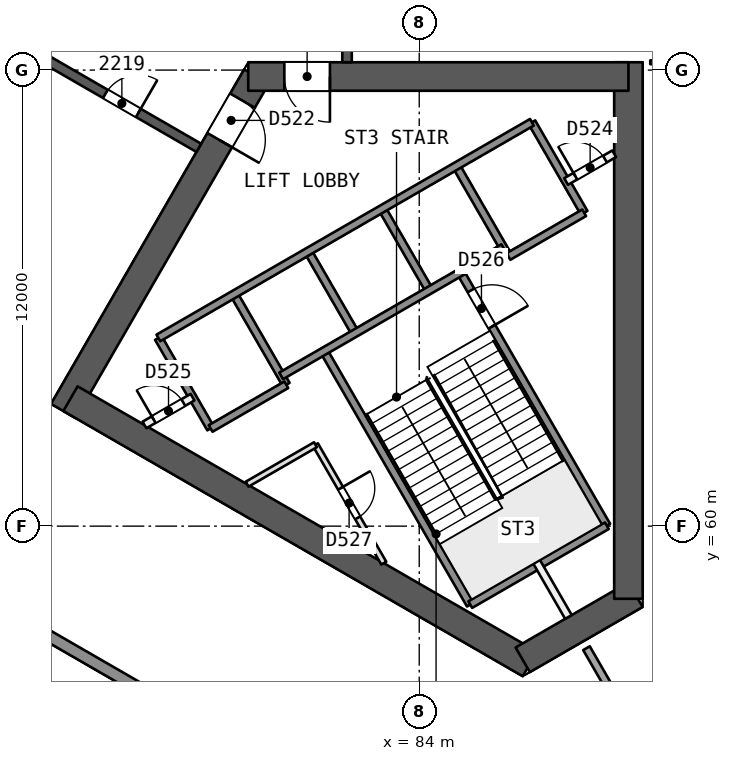
"""IFC4 building model, lengths in metres.
Left out: names, types, materials, properties, quantities, classifications, styles, units other than length and angle.
Written with IfcOpenShell. Run it as: python <this file> out.ifc"""

import sys

from ifc_helpers import new_model, si_unit, direction, frame, frame_2d, origin, place, context, subcontext, project, spatial, rectangle, extrude, element, fill, save


model = new_model("IFC4")
c1 = context("Model", 3, precision=1e-05, world=origin(), true_north=direction((0.0, 1.0)))
c2 = subcontext(c1, "Body", "Model", "MODEL_VIEW")
j1 = project(units=[si_unit("LENGTHUNIT", "METRE"), si_unit("PLANEANGLEUNIT", "RADIAN")], contexts=[c1])
p1 = place(None, origin())
s1 = spatial("IfcSite", under=j1, at=p1, CompositionType="ELEMENT")
p2 = place(p1, origin())
s2 = spatial("IfcBuilding", under=s1, at=p2, CompositionType="ELEMENT")
p3 = place(p2, frame((0.0, 0.0, 94.3)))
s3 = spatial("IfcBuildingStorey", under=s2, at=p3, CompositionType="ELEMENT", Elevation=94.3)
p4 = place(p3, frame((79.717, 71.831, 0.0), z_axis=(0.0, 0.0, 1.0), x_axis=(-0.499996230114, -0.866027580318, 0.0)))
e1 = element("IfcWall", 1, at=p4, inside=s3, PredefinedType="SHEAR", context=c2, shape_type="SweptSolid", body=[
    extrude(rectangle(XDim=10.164, YDim=0.75, at=frame_2d((5.082, 0.0))), origin(), (0.0, 0.0, 1.0), 3.7),
])
p5 = place(p4, frame((0.733, 0.0, 0.0)))
e2 = element("IfcOpeningElement", 2, at=p5, cuts=e1, PredefinedType="OPENING", context=c2, shape_type="SweptSolid", body=[
    extrude(rectangle(XDim=1.2, YDim=2.1, at=frame_2d((0.6, 1.05))), frame((0.0, 0.385, 0.0), z_axis=(0.0, -1.0, 0.0), x_axis=(1.0, 0.0, 0.0)), (0.0, 0.0, 1.0), 0.771),
])
p6 = place(p3, frame((74.822, 63.354, 0.0), z_axis=(0.0, 0.0, 1.0), x_axis=(0.8660248072, -0.500001033313, 0.0)))
e3 = element("IfcWall", 3, at=p6, inside=s3, PredefinedType="SHEAR", context=c2, shape_type="SweptSolid", body=[
    extrude(rectangle(XDim=13.958, YDim=0.75, at=frame_2d((6.979, 0.0))), origin(), (0.0, 0.0, 1.0), 3.7),
])
p7 = place(p3, frame((86.723, 56.483, 0.0), z_axis=(0.0, 0.0, 1.0), x_axis=(0.866017201164, 0.500014207086, 0.0)))
e4 = element("IfcWall", 4, at=p7, inside=s3, PredefinedType="SHEAR", context=c2, shape_type="SweptSolid", body=[
    extrude(rectangle(XDim=3.429, YDim=0.75, at=frame_2d((1.714, 0.0))), origin(), (0.0, 0.0, 1.0), 3.7),
])
p8 = place(p3, frame((89.505, 58.089, 0.0), z_axis=(0.0, 0.0, 1.0), x_axis=(0.0, 1.0, 0.0)))
e5 = element("IfcWall", 5, at=p8, inside=s3, PredefinedType="SHEAR", context=c2, shape_type="SweptSolid", body=[
    extrude(rectangle(XDim=14.117, YDim=0.75, at=frame_2d((7.059, 0.0))), origin(), (0.0, 0.0, 1.0), 3.7),
])
p9 = place(p3, frame((89.505, 71.831, 0.0), z_axis=(0.0, 0.0, 1.0), x_axis=(-1.0, 0.0, 0.0)))
e6 = element("IfcWall", 6, at=p9, inside=s3, PredefinedType="SHEAR", context=c2, shape_type="SweptSolid", body=[
    extrude(rectangle(XDim=10.005, YDim=0.75, at=frame_2d((5.002, 0.0))), origin(), (0.0, 0.0, 1.0), 3.7),
])
p10 = place(p9, frame((7.855, 0.0, 0.0)))
e7 = element("IfcOpeningElement", 7, at=p10, cuts=e6, PredefinedType="OPENING", context=c2, shape_type="SweptSolid", body=[
    extrude(rectangle(XDim=1.2, YDim=2.1, at=frame_2d((0.6, 1.05))), frame((0.0, 0.385, 0.0), z_axis=(0.0, -1.0, 0.0), x_axis=(1.0, 0.0, 0.0)), (0.0, 0.0, 1.0), 0.771),
])
p11 = place(p3, frame((82.1, 72.206, 0.0), z_axis=(0.0, 0.0, 1.0), x_axis=(0.0, 1.0, 0.0)))
e8 = element("IfcWall", 8, at=p11, inside=s3, PredefinedType="SHEAR", context=c2, shape_type="SweptSolid", body=[
    extrude(rectangle(XDim=15.588, YDim=0.25, at=frame_2d((7.794, 0.0))), origin(), (0.0, 0.0, 1.0), 3.25),
])
p12 = place(p11, frame((1.527, 0.0, 0.0)))
e9 = element("IfcOpeningElement", 9, at=p12, cuts=e8, PredefinedType="OPENING", context=c2, shape_type="SweptSolid", body=[
    extrude(rectangle(XDim=1.0, YDim=2.1, at=frame_2d((0.5, 1.05))), frame((0.0, 0.135, 0.0), z_axis=(0.0, -1.0, 0.0), x_axis=(1.0, 0.0, 0.0)), (0.0, 0.0, 1.0), 0.271),
])
p13 = place(p11, frame((8.694, 0.0, 0.0)))
e10 = element("IfcOpeningElement", 10, at=p13, cuts=e8, PredefinedType="OPENING", context=c2, shape_type="SweptSolid", body=[
    extrude(rectangle(XDim=1.1, YDim=2.1, at=frame_2d((0.55, 1.05))), frame((0.0, 0.135, 0.0), z_axis=(0.0, -1.0, 0.0), x_axis=(1.0, 0.0, 0.0)), (0.0, 0.0, 1.0), 0.271),
])
p14 = place(p11, frame((13.062, 0.0, 0.0)))
e11 = element("IfcOpeningElement", 11, at=p14, cuts=e8, PredefinedType="OPENING", context=c2, shape_type="SweptSolid", body=[
    extrude(rectangle(XDim=1.0, YDim=2.1, at=frame_2d((0.5, 1.05))), frame((0.0, 0.135, 0.0), z_axis=(0.0, -1.0, 0.0), x_axis=(1.0, 0.0, 0.0)), (0.0, 0.0, 1.0), 0.271),
])
p15 = place(p3, frame((64.7, 77.748, 0.0), z_axis=(0.0, 0.0, 1.0), x_axis=(0.866026492143, -0.499998114903, 0.0)))
e12 = element("IfcWall", 12, at=p15, inside=s3, PredefinedType="SHEAR", context=c2, shape_type="SweptSolid", body=[
    extrude(rectangle(XDim=15.588, YDim=0.25, at=frame_2d((7.794, 0.0))), origin(), (0.0, 0.0, 1.0), 3.25),
])
p16 = place(p15, frame((1.738, 0.0, 0.0)))
e13 = element("IfcOpeningElement", 13, at=p16, cuts=e12, PredefinedType="OPENING", context=c2, shape_type="SweptSolid", body=[
    extrude(rectangle(XDim=1.2, YDim=2.4, at=frame_2d((0.6, 1.2))), frame((0.0, 0.135, 0.0), z_axis=(0.0, -1.0, 0.0), x_axis=(1.0, 0.0, 0.0)), (0.0, 0.0, 1.0), 0.271),
])
p17 = place(p15, frame((5.785, 0.0, 0.0)))
e14 = element("IfcOpeningElement", 14, at=p17, cuts=e12, PredefinedType="OPENING", context=c2, shape_type="SweptSolid", body=[
    extrude(rectangle(XDim=0.9, YDim=2.1, at=frame_2d((0.45, 1.05))), frame((0.0, 0.135, 0.0), z_axis=(0.0, -1.0, 0.0), x_axis=(1.0, 0.0, 0.0)), (0.0, 0.0, 1.0), 0.271),
])
p18 = place(p15, frame((8.903, 0.0, 0.0)))
e15 = element("IfcOpeningElement", 15, at=p18, cuts=e12, PredefinedType="OPENING", context=c2, shape_type="SweptSolid", body=[
    extrude(rectangle(XDim=0.9, YDim=2.1, at=frame_2d((0.45, 1.05))), frame((0.0, 0.135, 0.0), z_axis=(0.0, -1.0, 0.0), x_axis=(1.0, 0.0, 0.0)), (0.0, 0.0, 1.0), 0.271),
])
p19 = place(p15, frame((12.75, 0.0, 0.0)))
e16 = element("IfcOpeningElement", 16, at=p19, cuts=e12, PredefinedType="OPENING", context=c2, shape_type="SweptSolid", body=[
    extrude(rectangle(XDim=1.0, YDim=2.1, at=frame_2d((0.5, 1.05))), frame((0.0, 0.135, 0.0), z_axis=(0.0, -1.0, 0.0), x_axis=(1.0, 0.0, 0.0)), (0.0, 0.0, 1.0), 0.271),
])
p20 = place(p3, frame((90.079, 72.206, 0.0), z_axis=(0.0, 0.0, 1.0), x_axis=(1.0, 0.0, 0.0)))
e17 = element("IfcWall", 17, at=p20, inside=s3, PredefinedType="PARTITIONING", context=c2, shape_type="SweptSolid", body=[
    extrude(rectangle(XDim=4.974, YDim=0.1, at=frame_2d((2.487, 0.0))), origin(), (0.0, 0.0, 1.0), 3.25),
])
p21 = place(p20, frame((2.037, 0.0, 0.0)))
e18 = element("IfcOpeningElement", 18, at=p21, cuts=e17, PredefinedType="OPENING", context=c2, shape_type="SweptSolid", body=[
    extrude(rectangle(XDim=0.9, YDim=2.1, at=frame_2d((0.45, 1.05))), frame((0.0, 0.061, 0.0), z_axis=(0.0, -1.0, 0.0), x_axis=(1.0, 0.0, 0.0)), (0.0, 0.0, 1.0), 0.121),
])
p22 = place(p3, frame((88.401, 56.789, 0.0), z_axis=(0.0, 0.0, 1.0), x_axis=(0.499996437432, -0.866027460624, 0.0)))
e19 = element("IfcWall", 19, at=p22, inside=s3, PredefinedType="PARTITIONING", context=c2, shape_type="SweptSolid", body=[
    extrude(rectangle(XDim=8.305, YDim=0.2, at=frame_2d((4.152, 0.0))), origin(), (0.0, 0.0, 1.0), 3.25),
])
p23 = place(p3, frame((90.054, 47.981, 0.0), z_axis=(0.0, 0.0, 1.0), x_axis=(-0.866025390357, 0.500000023256, 0.0)))
e20 = element("IfcWall", 20, at=p23, inside=s3, PredefinedType="SOLIDWALL", context=c2, shape_type="SweptSolid", body=[
    extrude(rectangle(XDim=58.093, YDim=0.3, at=frame_2d((29.046, 0.0))), origin(), (0.0, 0.0, 1.0), 3.25),
])
p24 = place(p23, frame((43.972, 0.0, 0.0)))
e21 = element("IfcOpeningElement", 21, at=p24, cuts=e20, PredefinedType="OPENING", context=c2, shape_type="SweptSolid", body=[
    extrude(rectangle(XDim=2.4, YDim=2.4, at=frame_2d((1.2, 1.2))), frame((0.0, 0.161, 0.0), z_axis=(0.0, -1.0, 0.0), x_axis=(1.0, 0.0, 0.0)), (0.0, 0.0, 1.0), 0.321),
])
p25 = place(p23, frame((22.39, 0.0, 0.0)))
e22 = element("IfcOpeningElement", 22, at=p25, cuts=e20, PredefinedType="OPENING", context=c2, shape_type="SweptSolid", body=[
    extrude(rectangle(XDim=2.4, YDim=2.4, at=frame_2d((1.2, 1.2))), frame((0.0, 0.161, 0.0), z_axis=(0.0, -1.0, 0.0), x_axis=(1.0, 0.0, 0.0)), (0.0, 0.0, 1.0), 0.321),
])
p26 = place(p23, frame((10.643, 0.0, 0.0)))
e23 = element("IfcOpeningElement", 23, at=p26, cuts=e20, PredefinedType="OPENING", context=c2, shape_type="SweptSolid", body=[
    extrude(rectangle(XDim=2.4, YDim=2.4, at=frame_2d((1.2, 1.2))), frame((0.0, 0.161, 0.0), z_axis=(0.0, -1.0, 0.0), x_axis=(1.0, 0.0, 0.0)), (0.0, 0.0, 1.0), 0.321),
])
p27 = place(p23, frame((29.705, 0.0, 0.9)))
e24 = element("IfcOpeningElement", 24, at=p27, cuts=e20, PredefinedType="OPENING", context=c2, shape_type="SweptSolid", body=[
    extrude(rectangle(XDim=1.8, YDim=1.5, at=frame_2d((0.9, 0.75))), frame((0.0, 0.161, 0.0), z_axis=(0.0, -1.0, 0.0), x_axis=(1.0, 0.0, 0.0)), (0.0, 0.0, 1.0), 0.321),
])
p28 = place(p23, frame((26.587, 0.0, 0.9)))
e25 = element("IfcOpeningElement", 25, at=p28, cuts=e20, PredefinedType="OPENING", context=c2, shape_type="SweptSolid", body=[
    extrude(rectangle(XDim=1.8, YDim=1.5, at=frame_2d((0.9, 0.75))), frame((0.0, 0.161, 0.0), z_axis=(0.0, -1.0, 0.0), x_axis=(1.0, 0.0, 0.0)), (0.0, 0.0, 1.0), 0.321),
])
p29 = place(p3, frame((77.135, 64.952, 0.0), z_axis=(0.0, 0.0, 1.0), x_axis=(0.499996545922, -0.866027397988, 0.0)))
e26 = element("IfcWall", 26, at=p29, inside=s3, PredefinedType="SOLIDWALL", context=c2, shape_type="SweptSolid", body=[
    extrude(rectangle(XDim=2.75, YDim=0.2, at=frame_2d((1.375, 0.0))), origin(), (0.0, 0.0, 1.0), 3.25),
])
p30 = place(p3, frame((81.269, 62.142, 0.0), z_axis=(0.0, 0.0, 1.0), x_axis=(0.500043557135, -0.866000254601, 0.0)))
e27 = element("IfcWall", 27, at=p30, inside=s3, PredefinedType="PARTITIONING", context=c2, shape_type="SweptSolid", body=[
    extrude(rectangle(XDim=3.598, YDim=0.15, at=frame_2d((1.799, 0.0))), origin(), (0.0, 0.0, 1.0), 3.25),
])
p31 = place(p30, frame((1.322, 0.0, 0.0)))
e28 = element("IfcOpeningElement", 28, at=p31, cuts=e27, PredefinedType="OPENING", context=c2, shape_type="SweptSolid", body=[
    extrude(rectangle(XDim=0.9, YDim=2.1, at=frame_2d((0.45, 1.05))), frame((0.0, 0.085, 0.0), z_axis=(0.0, -1.0, 0.0), x_axis=(1.0, 0.0, 0.0)), (0.0, 0.0, 1.0), 0.171),
])
p32 = place(p3, frame((79.127, 66.102, 0.0), z_axis=(0.0, 0.0, 1.0), x_axis=(0.499996545922, -0.866027397988, 0.0)))
e29 = element("IfcWall", 29, at=p32, inside=s3, PredefinedType="SOLIDWALL", context=c2, shape_type="SweptSolid", body=[
    extrude(rectangle(XDim=2.75, YDim=0.2, at=frame_2d((1.375, 0.0))), origin(), (0.0, 0.0, 1.0), 3.25),
])
p33 = place(p3, frame((81.493, 64.604, 0.0), z_axis=(0.0, 0.0, 1.0), x_axis=(0.500006057782, -0.866021906294, 0.0)))
e30 = element("IfcWall", 30, at=p33, inside=s3, PredefinedType="SOLIDWALL", context=c2, shape_type="SweptSolid", body=[
    extrude(rectangle(XDim=7.7, YDim=0.2, at=frame_2d((3.85, 0.0))), origin(), (0.0, 0.0, 1.0), 3.25),
])
p34 = place(p3, frame((81.076, 67.227, 0.0), z_axis=(0.0, 0.0, 1.0), x_axis=(0.50000366821, -0.866023285932, 0.0)))
e31 = element("IfcWall", 31, at=p34, inside=s3, PredefinedType="SOLIDWALL", context=c2, shape_type="SweptSolid", body=[
    extrude(rectangle(XDim=2.48, YDim=0.2, at=frame_2d((1.24, 0.0))), origin(), (0.0, 0.0, 1.0), 3.25),
])
p35 = place(p3, frame((87.09, 59.06, 0.0), z_axis=(0.0, 0.0, 1.0), x_axis=(0.499937194881, -0.866061661301, 0.0)))
e32 = element("IfcWall", 32, at=p35, inside=s3, PredefinedType="PARTITIONING", context=c2, shape_type="SweptSolid", body=[
    extrude(rectangle(XDim=1.673, YDim=0.2, at=frame_2d((0.836, 0.0))), origin(), (0.0, 0.0, 1.0), 3.25),
])
p36 = place(p3, frame((83.024, 68.352, 0.0), z_axis=(0.0, 0.0, 1.0), x_axis=(0.50000366821, -0.866023285932, 0.0)))
e33 = element("IfcWall", 33, at=p36, inside=s3, PredefinedType="SOLIDWALL", context=c2, shape_type="SweptSolid", body=[
    extrude(rectangle(XDim=2.48, YDim=0.2, at=frame_2d((1.24, 0.0))), origin(), (0.0, 0.0, 1.0), 3.25),
])
p37 = place(p3, frame((85.087, 66.679, 0.0), z_axis=(0.0, 0.0, 1.0), x_axis=(0.500019787375, -0.866013979237, 0.0)))
e34 = element("IfcWall", 34, at=p37, inside=s3, PredefinedType="SOLIDWALL", context=c2, shape_type="SweptSolid", body=[
    extrude(rectangle(XDim=7.7, YDim=0.2, at=frame_2d((3.85, 0.0))), origin(), (0.0, 0.0, 1.0), 3.25),
])
p38 = place(p37, frame((0.55, 0.0, 0.0)))
e35 = element("IfcOpeningElement", 35, at=p38, cuts=e34, PredefinedType="OPENING", context=c2, shape_type="SweptSolid", body=[
    extrude(rectangle(XDim=1.1, YDim=2.1, at=frame_2d((0.55, 1.05))), frame((0.0, 0.11, 0.0), z_axis=(0.0, -1.0, 0.0), x_axis=(1.0, 0.0, 0.0)), (0.0, 0.0, 1.0), 0.221),
])
for number, where, z_axis, x_axis in (
    (36, (84.973, 69.477, 0.0), (0.0, 0.0, 1.0), (0.5, -0.866, 0.0)),
    (37, (86.965, 70.626, 0.0), (0.0, 0.0, 1.0), (0.5, -0.866, 0.0)),
):
    element("IfcWall", number, at=place(p3, frame(where, z_axis=z_axis, x_axis=x_axis)), inside=s3, PredefinedType="SOLIDWALL", context=c2, shape_type="SweptSolid", body=[
        extrude(rectangle(XDim=2.75, YDim=0.2, at=frame_2d((1.375, 0.0))), origin(), (0.0, 0.0, 1.0), 3.25),
    ])
p39 = place(p3, frame((77.135, 64.952, 0.0), z_axis=(0.0, 0.0, 1.0), x_axis=(0.866031916153, 0.499988720078, 0.0)))
e38 = element("IfcWall", 38, at=p39, inside=s3, PredefinedType="SOLIDWALL", context=c2, shape_type="SweptSolid", body=[
    extrude(rectangle(XDim=11.35, YDim=0.2, at=frame_2d((5.675, 0.0))), origin(), (0.0, 0.0, 1.0), 3.25),
])
p40 = place(p3, frame((76.77, 62.662, 0.0), z_axis=(0.0, 0.0, 1.0), x_axis=(0.866054810376, 0.49994906283, 0.0)))
e39 = element("IfcWall", 39, at=p40, inside=s3, PredefinedType="PARTITIONING", context=c2, shape_type="SweptSolid", body=[
    extrude(rectangle(XDim=1.461, YDim=0.2, at=frame_2d((0.73, 0.0))), origin(), (0.0, 0.0, 1.0), 3.25),
])
p41 = place(p40, frame((0.281, 0.0, 0.0)))
e40 = element("IfcOpeningElement", 40, at=p41, cuts=e39, PredefinedType="OPENING", context=c2, shape_type="SweptSolid", body=[
    extrude(rectangle(XDim=0.9, YDim=2.1, at=frame_2d((0.45, 1.05))), frame((0.0, 0.11, 0.0), z_axis=(0.0, -1.0, 0.0), x_axis=(1.0, 0.0, 0.0)), (0.0, 0.0, 1.0), 0.221),
])
p42 = place(p3, frame((87.865, 69.068, 0.0), z_axis=(0.0, 0.0, 1.0), x_axis=(0.865982457891, 0.500074377092, 0.0)))
e41 = element("IfcWall", 41, at=p42, inside=s3, PredefinedType="PARTITIONING", context=c2, shape_type="SweptSolid", body=[
    extrude(rectangle(XDim=1.461, YDim=0.2, at=frame_2d((0.73, 0.0))), origin(), (0.0, 0.0, 1.0), 3.25),
])
p43 = place(p42, frame((0.281, 0.0, 0.0)))
e42 = element("IfcOpeningElement", 42, at=p43, cuts=e41, PredefinedType="OPENING", context=c2, shape_type="SweptSolid", body=[
    extrude(rectangle(XDim=0.9, YDim=2.1, at=frame_2d((0.45, 1.05))), frame((0.0, 0.11, 0.0), z_axis=(0.0, -1.0, 0.0), x_axis=(1.0, 0.0, 0.0)), (0.0, 0.0, 1.0), 0.221),
])
p44 = place(p3, frame((80.367, 63.954, 0.0), z_axis=(0.0, 0.0, 1.0), x_axis=(0.866026575979, 0.499997969693, 0.0)))
e43 = element("IfcWall", 43, at=p44, inside=s3, PredefinedType="SOLIDWALL", context=c2, shape_type="SweptSolid", body=[
    extrude(rectangle(XDim=6.75, YDim=0.2, at=frame_2d((3.375, 0.0))), origin(), (0.0, 0.0, 1.0), 3.25),
])
p45 = place(p3, frame((78.51, 62.57, 0.0), z_axis=(0.0, 0.0, 1.0), x_axis=(0.866053019151, 0.499952165731, 0.0)))
e44 = element("IfcWall", 44, at=p45, inside=s3, PredefinedType="SOLIDWALL", context=c2, shape_type="SweptSolid", body=[
    extrude(rectangle(XDim=2.3, YDim=0.2, at=frame_2d((1.15, 0.0))), origin(), (0.0, 0.0, 1.0), 3.25),
])
p46 = place(p3, frame((86.348, 67.095, 0.0), z_axis=(0.0, 0.0, 1.0), x_axis=(0.86602648383, 0.499998129301, 0.0)))
e45 = element("IfcWall", 45, at=p46, inside=s3, PredefinedType="SOLIDWALL", context=c2, shape_type="SweptSolid", body=[
    extrude(rectangle(XDim=2.3, YDim=0.2, at=frame_2d((1.15, 0.0))), origin(), (0.0, 0.0, 1.0), 3.25),
])
p47 = place(p3, frame((79.47, 61.103, 0.0), z_axis=(0.0, 0.0, 1.0), x_axis=(0.866021168401, 0.500007335828, 0.0)))
e46 = element("IfcWall", 46, at=p47, inside=s3, PredefinedType="PARTITIONING", context=c2, shape_type="SweptSolid", body=[
    extrude(rectangle(XDim=2.077, YDim=0.15, at=frame_2d((1.039, 0.0))), origin(), (0.0, 0.0, 1.0), 3.25),
])
p48 = place(p3, frame((85.343, 57.935, 0.0), z_axis=(0.0, 0.0, 1.0), x_axis=(0.866004344652, 0.500036473714, 0.0)))
e47 = element("IfcWall", 47, at=p48, inside=s3, PredefinedType="SOLIDWALL", context=c2, shape_type="SweptSolid", body=[
    extrude(rectangle(XDim=4.15, YDim=0.2, at=frame_2d((2.075, 0.0))), origin(), (0.0, 0.0, 1.0), 3.25),
])
p49 = place(p19, origin())
e48 = element("IfcDoor", 48, at=p49, inside=s3, OperationType="SINGLE_SWING_RIGHT", PredefinedType="NOTDEFINED", context=c2, shape_type="SweptSolid", body=[
    extrude(rectangle(XDim=1.0, YDim=2.1, at=frame_2d((0.5, 1.05))), frame((0.0, 0.025, 0.0), z_axis=(0.0, -1.0, 0.0), x_axis=(1.0, 0.0, 0.0)), (0.0, 0.0, 1.0), 0.05),
])
fill(e16, e48)
p50 = place(p5, origin())
e49 = element("IfcDoor", 49, at=p50, inside=s3, OperationType="SINGLE_SWING_RIGHT", PredefinedType="NOTDEFINED", context=c2, shape_type="SweptSolid", body=[
    extrude(rectangle(XDim=1.2, YDim=2.1, at=frame_2d((0.6, 1.05))), frame((0.0, 0.025, 0.0), z_axis=(0.0, -1.0, 0.0), x_axis=(1.0, 0.0, 0.0)), (0.0, 0.0, 1.0), 0.05),
])
fill(e2, e49)
p51 = place(p10, origin())
e50 = element("IfcDoor", 50, at=p51, inside=s3, OperationType="SINGLE_SWING_LEFT", PredefinedType="NOTDEFINED", context=c2, shape_type="SweptSolid", body=[
    extrude(rectangle(XDim=1.2, YDim=2.1, at=frame_2d((0.6, 1.05))), frame((0.0, 0.025, 0.0), z_axis=(0.0, -1.0, 0.0), x_axis=(1.0, 0.0, 0.0)), (0.0, 0.0, 1.0), 0.05),
])
fill(e7, e50)
p52 = place(p43, origin())
e51 = element("IfcDoor", 51, at=p52, inside=s3, OperationType="SINGLE_SWING_LEFT", PredefinedType="NOTDEFINED", context=c2, shape_type="SweptSolid", body=[
    extrude(rectangle(XDim=0.9, YDim=2.1, at=frame_2d((0.45, 1.05))), frame((0.0, 0.025, 0.0), z_axis=(0.0, -1.0, 0.0), x_axis=(1.0, 0.0, 0.0)), (0.0, 0.0, 1.0), 0.05),
])
fill(e42, e51)
p53 = place(p41, origin())
e52 = element("IfcDoor", 52, at=p53, inside=s3, OperationType="SINGLE_SWING_LEFT", PredefinedType="NOTDEFINED", context=c2, shape_type="SweptSolid", body=[
    extrude(rectangle(XDim=0.9, YDim=2.1, at=frame_2d((0.45, 1.05))), frame((0.0, 0.025, 0.0), z_axis=(0.0, -1.0, 0.0), x_axis=(1.0, 0.0, 0.0)), (0.0, 0.0, 1.0), 0.05),
])
fill(e40, e52)
p54 = place(p38, origin())
e53 = element("IfcDoor", 53, at=p54, inside=s3, OperationType="SINGLE_SWING_RIGHT", PredefinedType="NOTDEFINED", context=c2, shape_type="SweptSolid", body=[
    extrude(rectangle(XDim=1.1, YDim=2.1, at=frame_2d((0.55, 1.05))), frame((0.0, 0.025, 0.0), z_axis=(0.0, -1.0, 0.0), x_axis=(1.0, 0.0, 0.0)), (0.0, 0.0, 1.0), 0.05),
])
fill(e35, e53)
p55 = place(p31, origin())
e54 = element("IfcDoor", 54, at=p55, inside=s3, OperationType="SINGLE_SWING_LEFT", PredefinedType="NOTDEFINED", context=c2, shape_type="SweptSolid", body=[
    extrude(rectangle(XDim=0.9, YDim=2.1, at=frame_2d((0.45, 1.05))), frame((0.0, 0.025, 0.0), z_axis=(0.0, -1.0, 0.0), x_axis=(1.0, 0.0, 0.0)), (0.0, 0.0, 1.0), 0.05),
])
fill(e28, e54)
save(model, sys.argv[1])
